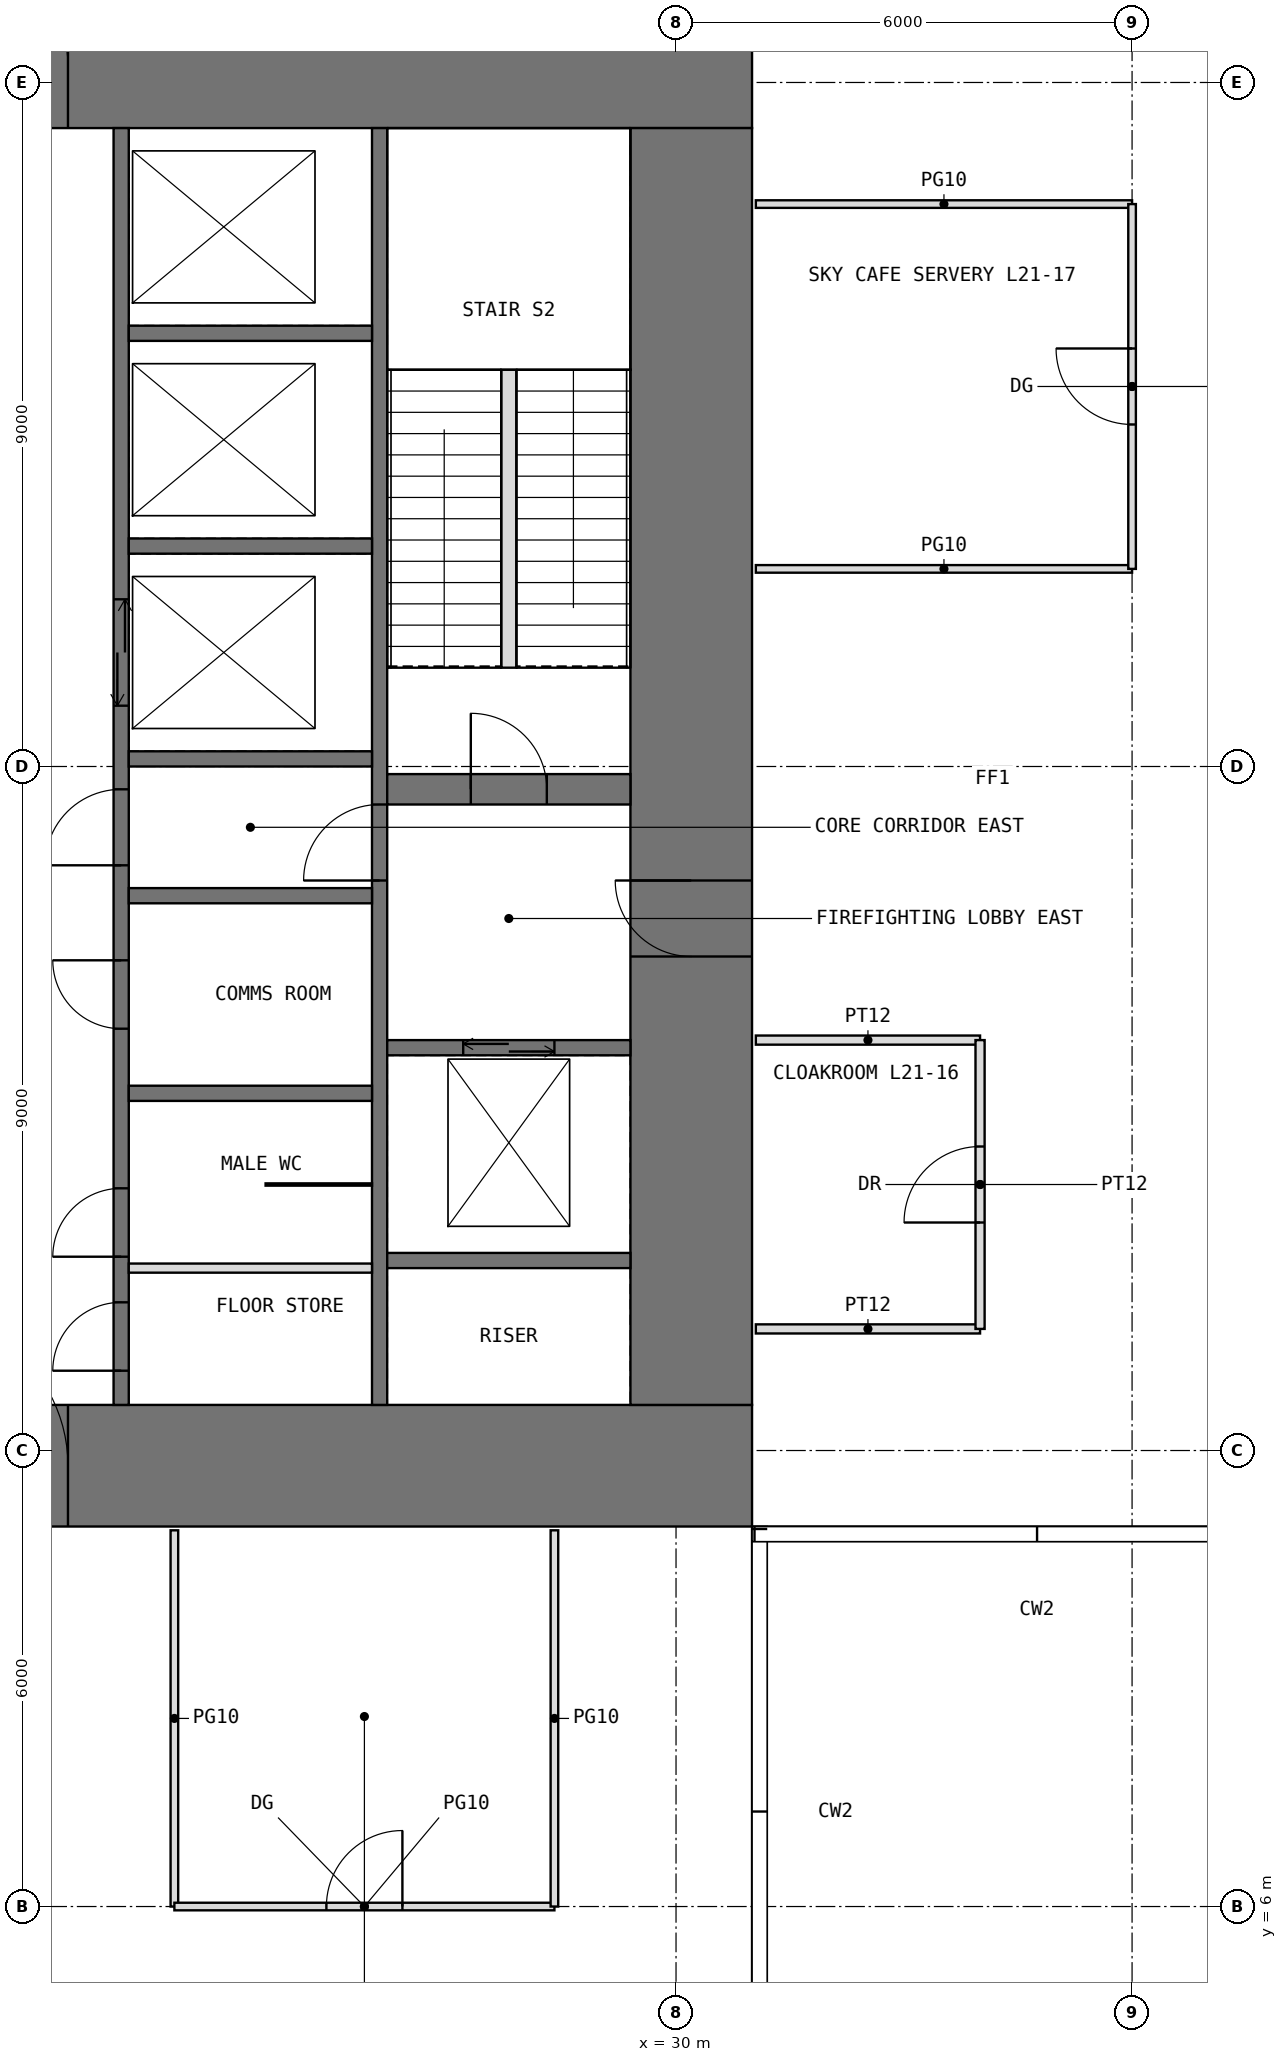
"""IFC4 building model, lengths in metres.
Left out: names, types, materials, properties, quantities, classifications, styles, units other than length and angle.
Written with IfcOpenShell. Run it as: python <this file> out.ifc"""

import sys

from ifc_helpers import new_model, si_unit, direction, frame, frame_2d, origin, place, context, subcontext, project, spatial, rectangle, extrude, element, fill, save


model = new_model("IFC4")
c1 = context("Model", 3, precision=1e-05, world=origin(), true_north=direction((0.0, 1.0)))
c2 = subcontext(c1, "Body", "Model", "MODEL_VIEW")
j1 = project(units=[si_unit("LENGTHUNIT", "METRE"), si_unit("PLANEANGLEUNIT", "RADIAN")], contexts=[c1])
p1 = place(None, origin())
s1 = spatial("IfcSite", under=j1, at=p1, CompositionType="ELEMENT")
p2 = place(p1, origin())
s2 = spatial("IfcBuilding", under=s1, at=p2, CompositionType="ELEMENT")
p3 = place(p2, frame((0.0, 0.0, 91.5)))
s3 = spatial("IfcBuildingStorey", under=s2, at=p3, CompositionType="ELEMENT", Elevation=91.5)
p4 = place(p3, frame((11.0, 11.8, -0.05), z_axis=(0.0, 0.0, 1.0), x_axis=(1.0, 0.0, 0.0)))
e1 = element("IfcWall", 1, at=p4, inside=s3, PredefinedType="SHEAR", context=c2, shape_type="SweptSolid", body=[
    extrude(rectangle(XDim=20.0, YDim=1.6, at=frame_2d((10.0, 0.0))), origin(), (0.0, 0.0, 1.0), 5.0),
])
p5 = place(p4, frame((9.0, 0.0, 0.05)))
e2 = element("IfcOpeningElement", 2, at=p5, cuts=e1, PredefinedType="OPENING", context=c2, shape_type="SweptSolid", body=[
    extrude(rectangle(XDim=2.0, YDim=2.2, at=frame_2d((1.0, 1.1))), frame((0.0, 0.81, 0.0), z_axis=(0.0, -1.0, 0.0), x_axis=(1.0, 0.0, 0.0)), (0.0, 0.0, 1.0), 1.62),
])
p6 = place(p3, frame((11.0, 30.2, -0.05), z_axis=(0.0, 0.0, 1.0), x_axis=(1.0, 0.0, 0.0)))
e3 = element("IfcWall", 3, at=p6, inside=s3, PredefinedType="SHEAR", context=c2, shape_type="SweptSolid", body=[
    extrude(rectangle(XDim=20.0, YDim=1.6, at=frame_2d((10.0, 0.0))), origin(), (0.0, 0.0, 1.0), 5.0),
])
p7 = place(p6, frame((9.0, 0.0, 0.05)))
e4 = element("IfcOpeningElement", 4, at=p7, cuts=e3, PredefinedType="OPENING", context=c2, shape_type="SweptSolid", body=[
    extrude(rectangle(XDim=2.0, YDim=2.2, at=frame_2d((1.0, 1.1))), frame((0.0, 0.81, 0.0), z_axis=(0.0, -1.0, 0.0), x_axis=(1.0, 0.0, 0.0)), (0.0, 0.0, 1.0), 1.62),
])
p8 = place(p3, frame((30.2, 12.6, -0.05), z_axis=(0.0, 0.0, 1.0), x_axis=(0.0, 1.0, 0.0)))
e5 = element("IfcWall", 5, at=p8, inside=s3, PredefinedType="SHEAR", context=c2, shape_type="SweptSolid", body=[
    extrude(rectangle(XDim=16.8, YDim=1.6, at=frame_2d((8.4, 0.0))), origin(), (0.0, 0.0, 1.0), 5.0),
])
p9 = place(p8, frame((5.9, 0.0, 0.05)))
e6 = element("IfcOpeningElement", 6, at=p9, cuts=e5, PredefinedType="OPENING", context=c2, shape_type="SweptSolid", body=[
    extrude(rectangle(XDim=1.0, YDim=2.2, at=frame_2d((0.5, 1.1))), frame((0.0, 0.81, 0.0), z_axis=(0.0, -1.0, 0.0), x_axis=(1.0, 0.0, 0.0)), (0.0, 0.0, 1.0), 1.62),
])
p10 = place(p3, frame((22.7, 12.6, -0.05), z_axis=(0.0, 0.0, 1.0), x_axis=(0.0, 1.0, 0.0)))
e7 = element("IfcWall", 7, at=p10, inside=s3, PredefinedType="SHEAR", context=c2, shape_type="SweptSolid", body=[
    extrude(rectangle(XDim=16.8, YDim=0.2, at=frame_2d((8.4, 0.0))), origin(), (0.0, 0.0, 1.0), 5.0),
])
p11 = place(p10, frame((0.45, 0.0, 0.05)))
e8 = element("IfcOpeningElement", 8, at=p11, cuts=e7, PredefinedType="OPENING", context=c2, shape_type="SweptSolid", body=[
    extrude(rectangle(XDim=0.9, YDim=2.2, at=frame_2d((0.45, 1.1))), frame((0.0, 0.11, 0.0), z_axis=(0.0, -1.0, 0.0), x_axis=(1.0, 0.0, 0.0)), (0.0, 0.0, 1.0), 0.22),
])
p12 = place(p10, frame((7.1, 0.0, 0.05)))
e9 = element("IfcOpeningElement", 9, at=p12, cuts=e7, PredefinedType="OPENING", context=c2, shape_type="SweptSolid", body=[
    extrude(rectangle(XDim=1.0, YDim=2.2, at=frame_2d((0.5, 1.1))), frame((0.0, 0.11, 0.0), z_axis=(0.0, -1.0, 0.0), x_axis=(1.0, 0.0, 0.0)), (0.0, 0.0, 1.0), 0.22),
])
p13 = place(p10, frame((1.95, 0.0, 0.05)))
e10 = element("IfcOpeningElement", 10, at=p13, cuts=e7, PredefinedType="OPENING", context=c2, shape_type="SweptSolid", body=[
    extrude(rectangle(XDim=0.9, YDim=2.2, at=frame_2d((0.45, 1.1))), frame((0.0, 0.11, 0.0), z_axis=(0.0, -1.0, 0.0), x_axis=(1.0, 0.0, 0.0)), (0.0, 0.0, 1.0), 0.22),
])
p14 = place(p10, frame((4.95, 0.0, 0.05)))
e11 = element("IfcOpeningElement", 11, at=p14, cuts=e7, PredefinedType="OPENING", context=c2, shape_type="SweptSolid", body=[
    extrude(rectangle(XDim=0.9, YDim=2.2, at=frame_2d((0.45, 1.1))), frame((0.0, 0.11, 0.0), z_axis=(0.0, -1.0, 0.0), x_axis=(1.0, 0.0, 0.0)), (0.0, 0.0, 1.0), 0.22),
])
p15 = place(p10, frame((9.2, 0.0, 0.05)))
e12 = element("IfcOpeningElement", 12, at=p15, cuts=e7, PredefinedType="OPENING", context=c2, shape_type="SweptSolid", body=[
    extrude(rectangle(XDim=1.4, YDim=2.4, at=frame_2d((0.7, 1.2))), frame((0.0, 0.11, 0.0), z_axis=(0.0, -1.0, 0.0), x_axis=(1.0, 0.0, 0.0)), (0.0, 0.0, 1.0), 0.22),
])
p16 = place(p3, frame((26.1, 12.6, -0.05), z_axis=(0.0, 0.0, 1.0), x_axis=(0.0, 1.0, 0.0)))
e13 = element("IfcWall", 13, at=p16, inside=s3, PredefinedType="SHEAR", context=c2, shape_type="SweptSolid", body=[
    extrude(rectangle(XDim=16.8, YDim=0.2, at=frame_2d((8.4, 0.0))), origin(), (0.0, 0.0, 1.0), 5.0),
])
p17 = place(p16, frame((6.9, 0.0, 0.05)))
e14 = element("IfcOpeningElement", 14, at=p17, cuts=e13, PredefinedType="OPENING", context=c2, shape_type="SweptSolid", body=[
    extrude(rectangle(XDim=1.0, YDim=2.2, at=frame_2d((0.5, 1.1))), frame((0.0, 0.11, 0.0), z_axis=(0.0, -1.0, 0.0), x_axis=(1.0, 0.0, 0.0)), (0.0, 0.0, 1.0), 0.22),
])
for number, where, z_axis, x_axis in (
    (15, (22.8, 16.7, -0.05), (0.0, 0.0, 1.0), (1.0, 0.0, 0.0)),
    (16, (22.8, 19.3, -0.05), (0.0, 0.0, 1.0), (1.0, 0.0, 0.0)),
    (17, (22.8, 21.1, -0.05), (0.0, 0.0, 1.0), (1.0, 0.0, 0.0)),
    (18, (22.8, 23.9, -0.05), (0.0, 0.0, 1.0), (1.0, 0.0, 0.0)),
    (19, (22.8, 26.7, -0.05), (0.0, 0.0, 1.0), (1.0, 0.0, 0.0)),
    (20, (26.2, 14.5, -0.05), (0.0, 0.0, 1.0), (1.0, 0.0, 0.0)),
):
    element("IfcWall", number, at=place(p3, frame(where, z_axis=z_axis, x_axis=x_axis)), inside=s3, PredefinedType="SHEAR", context=c2, shape_type="SweptSolid", body=[
        extrude(rectangle(XDim=3.2, YDim=0.2, at=frame_2d((1.6, 0.0))), origin(), (0.0, 0.0, 1.0), 5.0),
    ])
p18 = place(p3, frame((26.2, 17.3, -0.05), z_axis=(0.0, 0.0, 1.0), x_axis=(1.0, 0.0, 0.0)))
e21 = element("IfcWall", 21, at=p18, inside=s3, PredefinedType="SHEAR", context=c2, shape_type="SweptSolid", body=[
    extrude(rectangle(XDim=3.2, YDim=0.2, at=frame_2d((1.6, 0.0))), origin(), (0.0, 0.0, 1.0), 5.0),
])
p19 = place(p18, frame((1.0, 0.0, 0.05)))
e22 = element("IfcOpeningElement", 22, at=p19, cuts=e21, PredefinedType="OPENING", context=c2, shape_type="SweptSolid", body=[
    extrude(rectangle(XDim=1.2, YDim=2.2, at=frame_2d((0.6, 1.1))), frame((0.0, 0.11, 0.0), z_axis=(0.0, -1.0, 0.0), x_axis=(1.0, 0.0, 0.0)), (0.0, 0.0, 1.0), 0.22),
])
p20 = place(p3, frame((26.2, 20.7, -0.05), z_axis=(0.0, 0.0, 1.0), x_axis=(1.0, 0.0, 0.0)))
e23 = element("IfcWall", 23, at=p20, inside=s3, PredefinedType="SHEAR", context=c2, shape_type="SweptSolid", body=[
    extrude(rectangle(XDim=3.2, YDim=0.4, at=frame_2d((1.6, 0.0))), origin(), (0.0, 0.0, 1.0), 5.0),
])
p21 = place(p20, frame((1.1, 0.0, 0.05)))
e24 = element("IfcOpeningElement", 24, at=p21, cuts=e23, PredefinedType="OPENING", context=c2, shape_type="SweptSolid", body=[
    extrude(rectangle(XDim=1.0, YDim=2.2, at=frame_2d((0.5, 1.1))), frame((0.0, 0.21, 0.0), z_axis=(0.0, -1.0, 0.0), x_axis=(1.0, 0.0, 0.0)), (0.0, 0.0, 1.0), 0.42),
])
p22 = place(p3, frame((22.8, 14.4, 0.0), z_axis=(0.0, 0.0, 1.0), x_axis=(1.0, 0.0, 0.0)))
e25 = element("IfcWall", 25, at=p22, inside=s3, PredefinedType="PARTITIONING", context=c2, shape_type="SweptSolid", body=[
    extrude(rectangle(XDim=3.2, YDim=0.12, at=frame_2d((1.6, 0.0))), origin(), (0.0, 0.0, 1.0), 4.75),
])
p23 = place(p3, frame((24.6, 15.5, 0.0), z_axis=(0.0, 0.0, 1.0), x_axis=(1.0, 0.0, 0.0)))
e26 = element("IfcWall", 26, at=p23, inside=s3, PredefinedType="PARTITIONING", context=c2, shape_type="SweptSolid", body=[
    extrude(rectangle(XDim=1.4, YDim=0.03, at=frame_2d((0.7, 0.0))), origin(), (0.0, 0.0, 1.0), 4.75),
])
p24 = place(p3, frame((23.4, 6.0, 0.0), z_axis=(0.0, 0.0, 1.0), x_axis=(0.0, 1.0, 0.0)))
e27 = element("IfcWall", 27, at=p24, inside=s3, PredefinedType="PARTITIONING", context=c2, shape_type="SweptSolid", body=[
    extrude(rectangle(XDim=4.95, YDim=0.1, at=frame_2d((2.475, 0.0))), origin(), (0.0, 0.0, 1.0), 4.75),
])
p25 = place(p3, frame((23.4, 6.0, 0.0), z_axis=(0.0, 0.0, 1.0), x_axis=(1.0, 0.0, 0.0)))
e28 = element("IfcWall", 28, at=p25, inside=s3, PredefinedType="PARTITIONING", context=c2, shape_type="SweptSolid", body=[
    extrude(rectangle(XDim=5.0, YDim=0.1, at=frame_2d((2.5, 0.0))), origin(), (0.0, 0.0, 1.0), 4.75),
])
p26 = place(p25, frame((2.0, 0.0, 0.0)))
e29 = element("IfcOpeningElement", 29, at=p26, cuts=e28, PredefinedType="OPENING", context=c2, shape_type="SweptSolid", body=[
    extrude(rectangle(XDim=1.0, YDim=2.4, at=frame_2d((0.5, 1.2))), frame((0.0, 0.06, 0.0), z_axis=(0.0, -1.0, 0.0), x_axis=(1.0, 0.0, 0.0)), (0.0, 0.0, 1.0), 0.12),
])
p27 = place(p3, frame((28.4, 6.0, 0.0), z_axis=(0.0, 0.0, 1.0), x_axis=(0.0, 1.0, 0.0)))
e30 = element("IfcWall", 30, at=p27, inside=s3, PredefinedType="PARTITIONING", context=c2, shape_type="SweptSolid", body=[
    extrude(rectangle(XDim=4.95, YDim=0.1, at=frame_2d((2.475, 0.0))), origin(), (0.0, 0.0, 1.0), 4.75),
])
for number, where, z_axis, x_axis in (
    (31, (31.05, 13.6, 0.0), (0.0, 0.0, 1.0), (1.0, 0.0, 0.0)),
    (32, (31.05, 17.4, 0.0), (0.0, 0.0, 1.0), (1.0, 0.0, 0.0)),
):
    element("IfcWall", number, at=place(p3, frame(where, z_axis=z_axis, x_axis=x_axis)), inside=s3, PredefinedType="PARTITIONING", context=c2, shape_type="SweptSolid", body=[
        extrude(rectangle(XDim=2.95, YDim=0.12, at=frame_2d((1.475, 0.0))), origin(), (0.0, 0.0, 1.0), 4.75),
    ])
for number, where, z_axis, x_axis in (
    (33, (31.05, 23.6, 0.0), (0.0, 0.0, 1.0), (1.0, 0.0, 0.0)),
    (34, (31.05, 28.4, 0.0), (0.0, 0.0, 1.0), (1.0, 0.0, 0.0)),
):
    element("IfcWall", number, at=place(p3, frame(where, z_axis=z_axis, x_axis=x_axis)), inside=s3, PredefinedType="PARTITIONING", context=c2, shape_type="SweptSolid", body=[
        extrude(rectangle(XDim=4.95, YDim=0.1, at=frame_2d((2.475, 0.0))), origin(), (0.0, 0.0, 1.0), 4.75),
    ])
p28 = place(p3, frame((34.0, 13.6, 0.0), z_axis=(0.0, 0.0, 1.0), x_axis=(0.0, 1.0, 0.0)))
e35 = element("IfcWall", 35, at=p28, inside=s3, PredefinedType="PARTITIONING", context=c2, shape_type="SweptSolid", body=[
    extrude(rectangle(XDim=3.8, YDim=0.12, at=frame_2d((1.9, 0.0))), origin(), (0.0, 0.0, 1.0), 4.75),
])
p29 = place(p28, frame((1.4, 0.0, 0.0)))
e36 = element("IfcOpeningElement", 36, at=p29, cuts=e35, PredefinedType="OPENING", context=c2, shape_type="SweptSolid", body=[
    extrude(rectangle(XDim=1.0, YDim=2.2, at=frame_2d((0.5, 1.1))), frame((0.0, 0.07, 0.0), z_axis=(0.0, -1.0, 0.0), x_axis=(1.0, 0.0, 0.0)), (0.0, 0.0, 1.0), 0.14),
])
p30 = place(p3, frame((36.0, 23.6, 0.0), z_axis=(0.0, 0.0, 1.0), x_axis=(0.0, 1.0, 0.0)))
e37 = element("IfcWall", 37, at=p30, inside=s3, PredefinedType="PARTITIONING", context=c2, shape_type="SweptSolid", body=[
    extrude(rectangle(XDim=4.8, YDim=0.1, at=frame_2d((2.4, 0.0))), origin(), (0.0, 0.0, 1.0), 4.75),
])
p31 = place(p30, frame((1.9, 0.0, 0.0)))
e38 = element("IfcOpeningElement", 38, at=p31, cuts=e37, PredefinedType="OPENING", context=c2, shape_type="SweptSolid", body=[
    extrude(rectangle(XDim=1.0, YDim=2.4, at=frame_2d((0.5, 1.2))), frame((0.0, 0.06, 0.0), z_axis=(0.0, -1.0, 0.0), x_axis=(1.0, 0.0, 0.0)), (0.0, 0.0, 1.0), 0.12),
])
p32 = place(p3, frame((27.8, 22.3, 0.0), z_axis=(0.0, 0.0, 1.0), x_axis=(0.0, 1.0, 0.0)))
e39 = element("IfcWall", 39, at=p32, inside=s3, PredefinedType="PARTITIONING", context=c2, shape_type="SweptSolid", body=[
    extrude(rectangle(XDim=3.92, YDim=0.2, at=frame_2d((1.96, 0.0))), origin(), (0.0, 0.0, 1.0), 5.0),
])
p33 = place(p5, origin())
e40 = element("IfcDoor", 40, at=p33, inside=s3, OperationType="DOUBLE_DOOR_SINGLE_SWING", PredefinedType="DOOR", context=c2, shape_type="SweptSolid", body=[
    extrude(rectangle(XDim=2.0, YDim=2.2, at=frame_2d((1.0, 1.1))), frame((0.0, 0.025, 0.0), z_axis=(0.0, -1.0, 0.0), x_axis=(1.0, 0.0, 0.0)), (0.0, 0.0, 1.0), 0.05),
])
fill(e2, e40)
p34 = place(p7, origin())
e41 = element("IfcDoor", 41, at=p34, inside=s3, OperationType="DOUBLE_DOOR_SINGLE_SWING", PredefinedType="DOOR", context=c2, shape_type="SweptSolid", body=[
    extrude(rectangle(XDim=2.0, YDim=2.2, at=frame_2d((1.0, 1.1))), frame((0.0, 0.025, 0.0), z_axis=(0.0, -1.0, 0.0), x_axis=(1.0, 0.0, 0.0)), (0.0, 0.0, 1.0), 0.05),
])
fill(e4, e41)
p35 = place(p11, origin())
e42 = element("IfcDoor", 42, at=p35, inside=s3, OperationType="SINGLE_SWING_LEFT", PredefinedType="DOOR", context=c2, shape_type="SweptSolid", body=[
    extrude(rectangle(XDim=0.9, YDim=2.2, at=frame_2d((0.45, 1.1))), frame((0.0, 0.025, 0.0), z_axis=(0.0, -1.0, 0.0), x_axis=(1.0, 0.0, 0.0)), (0.0, 0.0, 1.0), 0.05),
])
fill(e8, e42)
p36 = place(p9, origin())
e43 = element("IfcDoor", 43, at=p36, inside=s3, OperationType="SINGLE_SWING_RIGHT", PredefinedType="DOOR", context=c2, shape_type="SweptSolid", body=[
    extrude(rectangle(XDim=1.0, YDim=2.2, at=frame_2d((0.5, 1.1))), frame((0.0, 0.025, 0.0), z_axis=(0.0, -1.0, 0.0), x_axis=(1.0, 0.0, 0.0)), (0.0, 0.0, 1.0), 0.05),
])
fill(e6, e43)
p37 = place(p21, origin())
e44 = element("IfcDoor", 44, at=p37, inside=s3, OperationType="SINGLE_SWING_LEFT", PredefinedType="DOOR", context=c2, shape_type="SweptSolid", body=[
    extrude(rectangle(XDim=1.0, YDim=2.2, at=frame_2d((0.5, 1.1))), frame((0.0, 0.025, 0.0), z_axis=(0.0, -1.0, 0.0), x_axis=(1.0, 0.0, 0.0)), (0.0, 0.0, 1.0), 0.05),
])
fill(e24, e44)
p38 = place(p17, origin())
e45 = element("IfcDoor", 45, at=p38, inside=s3, OperationType="SINGLE_SWING_LEFT", PredefinedType="DOOR", context=c2, shape_type="SweptSolid", body=[
    extrude(rectangle(XDim=1.0, YDim=2.2, at=frame_2d((0.5, 1.1))), frame((0.0, 0.025, 0.0), z_axis=(0.0, -1.0, 0.0), x_axis=(1.0, 0.0, 0.0)), (0.0, 0.0, 1.0), 0.05),
])
fill(e14, e45)
p39 = place(p12, origin())
e46 = element("IfcDoor", 46, at=p39, inside=s3, OperationType="SINGLE_SWING_LEFT", PredefinedType="DOOR", context=c2, shape_type="SweptSolid", body=[
    extrude(rectangle(XDim=1.0, YDim=2.2, at=frame_2d((0.5, 1.1))), frame((0.0, 0.025, 0.0), z_axis=(0.0, -1.0, 0.0), x_axis=(1.0, 0.0, 0.0)), (0.0, 0.0, 1.0), 0.05),
])
fill(e9, e46)
p40 = place(p13, origin())
e47 = element("IfcDoor", 47, at=p40, inside=s3, OperationType="SINGLE_SWING_LEFT", PredefinedType="DOOR", context=c2, shape_type="SweptSolid", body=[
    extrude(rectangle(XDim=0.9, YDim=2.2, at=frame_2d((0.45, 1.1))), frame((0.0, 0.025, 0.0), z_axis=(0.0, -1.0, 0.0), x_axis=(1.0, 0.0, 0.0)), (0.0, 0.0, 1.0), 0.05),
])
fill(e10, e47)
p41 = place(p14, origin())
e48 = element("IfcDoor", 48, at=p41, inside=s3, OperationType="SINGLE_SWING_RIGHT", PredefinedType="DOOR", context=c2, shape_type="SweptSolid", body=[
    extrude(rectangle(XDim=0.9, YDim=2.2, at=frame_2d((0.45, 1.1))), frame((0.0, 0.025, 0.0), z_axis=(0.0, -1.0, 0.0), x_axis=(1.0, 0.0, 0.0)), (0.0, 0.0, 1.0), 0.05),
])
fill(e11, e48)
p42 = place(p26, origin())
e49 = element("IfcDoor", 49, at=p42, inside=s3, OperationType="SINGLE_SWING_RIGHT", PredefinedType="DOOR", context=c2, shape_type="SweptSolid", body=[
    extrude(rectangle(XDim=1.0, YDim=2.4, at=frame_2d((0.5, 1.2))), frame((0.0, 0.025, 0.0), z_axis=(0.0, -1.0, 0.0), x_axis=(1.0, 0.0, 0.0)), (0.0, 0.0, 1.0), 0.05),
])
fill(e29, e49)
p43 = place(p29, origin())
e50 = element("IfcDoor", 50, at=p43, inside=s3, OperationType="SINGLE_SWING_LEFT", PredefinedType="DOOR", context=c2, shape_type="SweptSolid", body=[
    extrude(rectangle(XDim=1.0, YDim=2.2, at=frame_2d((0.5, 1.1))), frame((0.0, 0.025, 0.0), z_axis=(0.0, -1.0, 0.0), x_axis=(1.0, 0.0, 0.0)), (0.0, 0.0, 1.0), 0.05),
])
fill(e36, e50)
p44 = place(p31, origin())
e51 = element("IfcDoor", 51, at=p44, inside=s3, OperationType="SINGLE_SWING_RIGHT", PredefinedType="DOOR", context=c2, shape_type="SweptSolid", body=[
    extrude(rectangle(XDim=1.0, YDim=2.4, at=frame_2d((0.5, 1.2))), frame((0.0, 0.025, 0.0), z_axis=(0.0, -1.0, 0.0), x_axis=(1.0, 0.0, 0.0)), (0.0, 0.0, 1.0), 0.05),
])
fill(e38, e51)
p45 = place(p15, origin())
e52 = element("IfcDoor", 52, at=p45, inside=s3, OperationType="DOUBLE_DOOR_SLIDING", PredefinedType="DOOR", context=c2, shape_type="SweptSolid", body=[
    extrude(rectangle(XDim=1.4, YDim=2.4, at=frame_2d((0.7, 1.2))), frame((0.0, 0.025, 0.0), z_axis=(0.0, -1.0, 0.0), x_axis=(1.0, 0.0, 0.0)), (0.0, 0.0, 1.0), 0.05),
])
fill(e12, e52)
p46 = place(p19, origin())
e53 = element("IfcDoor", 53, at=p46, inside=s3, OperationType="DOUBLE_DOOR_SLIDING", PredefinedType="DOOR", context=c2, shape_type="SweptSolid", body=[
    extrude(rectangle(XDim=1.2, YDim=2.2, at=frame_2d((0.6, 1.1))), frame((0.0, 0.025, 0.0), z_axis=(0.0, -1.0, 0.0), x_axis=(1.0, 0.0, 0.0)), (0.0, 0.0, 1.0), 0.05),
])
fill(e22, e53)
save(model, sys.argv[1])
